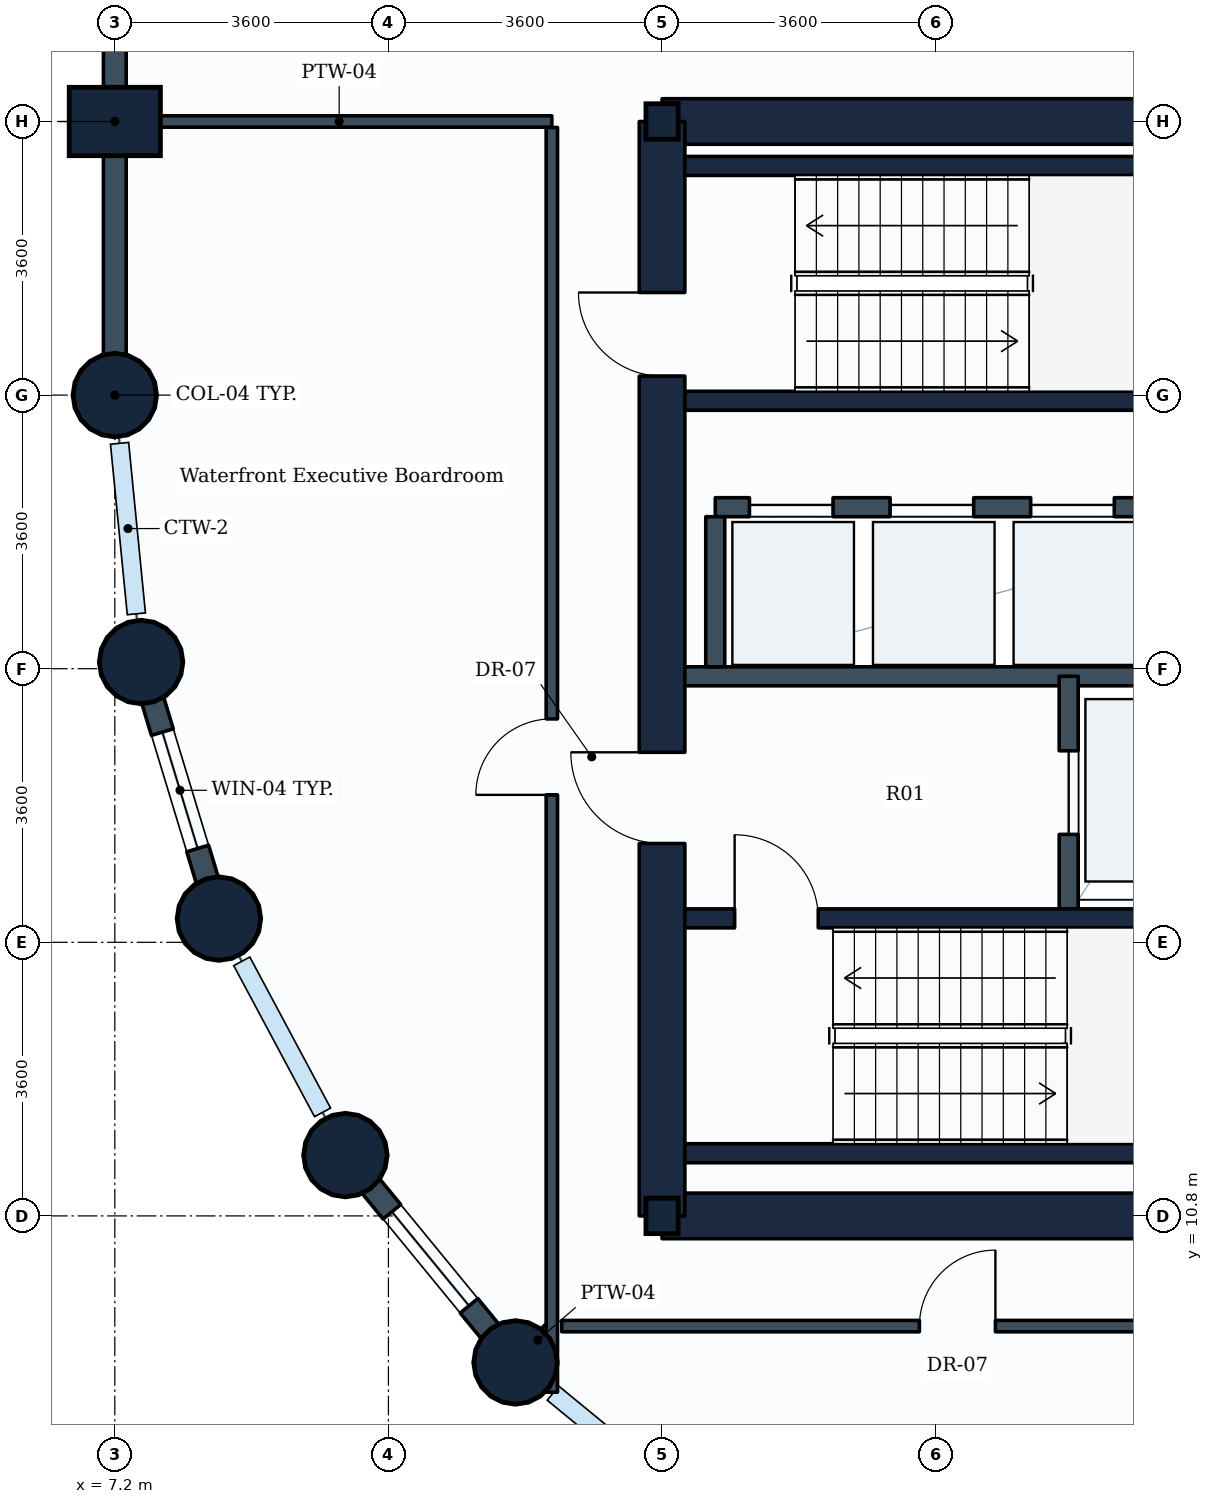
"""IFC4 building model, lengths in metres.
Left out: names, types, materials, properties, quantities, classifications, styles, units other than length and angle.
Written with IfcOpenShell. Run it as: python <this file> out.ifc"""

import sys

from ifc_helpers import new_model, si_unit, direction, frame, frame_2d, origin, origin_2d, place, context, subcontext, project, spatial, rectangle, circle, i_section, extrude, element, fill, save


model = new_model("IFC4")
c1 = context("Model", 3, precision=1e-05, world=origin(), true_north=direction((0.0, 1.0)))
c2 = subcontext(c1, "Body", "Model", "MODEL_VIEW")
j1 = project(units=[si_unit("LENGTHUNIT", "METRE"), si_unit("PLANEANGLEUNIT", "RADIAN")], contexts=[c1])
p1 = place(None, origin())
s1 = spatial("IfcSite", under=j1, at=p1, CompositionType="ELEMENT")
p2 = place(p1, origin())
s2 = spatial("IfcBuilding", under=s1, at=p2, CompositionType="ELEMENT")
p3 = place(p2, frame((0.0, 0.0, 27.9)))
s3 = spatial("IfcBuildingStorey", under=s2, at=p3, CompositionType="ELEMENT", Elevation=27.9)
p4 = place(p3, frame((7.2, 21.6, 0.0), z_axis=(0.0, 0.0, 1.0), x_axis=(1.0, 0.0, 0.0)))
e1 = element("IfcColumn", 1, at=p4, inside=s3, PredefinedType="COLUMN", context=c2, shape_type="SweptSolid", body=[
    extrude(circle(Radius=0.55, at=origin_2d()), origin(), (0.0, 0.0, 1.0), 3.9),
])
p5 = place(p3, frame((7.2, 25.2, 0.0), z_axis=(0.0, 0.0, 1.0), x_axis=(0.0, 1.0, 0.0)))
e2 = element("IfcColumn", 2, at=p5, inside=s3, PredefinedType="COLUMN", context=c2, shape_type="SweptSolid", body=[
    extrude(rectangle(XDim=0.9, YDim=1.2, at=origin_2d()), origin(), (0.0, 0.0, 1.0), 3.9),
])
for number, where, z_axis, x_axis in (
    (3, (7.546, 18.088, 0.0), (0.0, 0.0, 1.0), (1.0, 0.0, 0.0)),
    (4, (8.57, 14.712, 0.0), (0.0, 0.0, 1.0), (1.0, 0.0, 0.0)),
    (5, (10.234, 11.6, 0.0), (0.0, 0.0, 1.0), (1.0, 0.0, 0.0)),
    (6, (12.472, 8.872, 0.0), (0.0, 0.0, 1.0), (1.0, 0.0, 0.0)),
):
    element("IfcColumn", number, at=place(p3, frame(where, z_axis=z_axis, x_axis=x_axis)), inside=s3, PredefinedType="COLUMN", context=c2, shape_type="SweptSolid", body=[
        extrude(circle(Radius=0.55, at=origin_2d()), origin(), (0.0, 0.0, 1.0), 3.9),
    ])
for number, where, z_axis, x_axis in (
    (7, (14.4, 10.8, 0.0), (0.0, 0.0, 1.0), (1.0, 0.0, 0.0)),
    (8, (14.4, 25.2, 0.0), (0.0, 0.0, 1.0), (1.0, 0.0, 0.0)),
):
    element("IfcColumn", number, at=place(p3, frame(where, z_axis=z_axis, x_axis=x_axis)), inside=s3, PredefinedType="COLUMN", context=c2, shape_type="SweptSolid", body=[
        extrude(i_section(OverallWidth=0.424, OverallDepth=0.467, WebThickness=0.033, FlangeThickness=0.053, FilletRadius=0.015, at=origin_2d()), origin(), (0.0, 0.0, 1.0), 3.9),
    ])
p6 = place(p3, frame((7.2, 25.2, 0.0), z_axis=(0.0, 0.0, 1.0), x_axis=(0.0, 1.0, 0.0)))
e9 = element("IfcWall", 9, at=p6, inside=s3, PredefinedType="STANDARD", context=c2, shape_type="SweptSolid", body=[
    extrude(rectangle(XDim=3.6, YDim=0.3, at=frame_2d((1.8, 0.0))), origin(), (0.0, 0.0, 1.0), 2.93),
])
p7 = place(p3, frame((7.2, 21.6, 0.0), z_axis=(0.0, 0.0, 1.0), x_axis=(0.0, 1.0, 0.0)))
e10 = element("IfcWall", 10, at=p7, inside=s3, PredefinedType="STANDARD", context=c2, shape_type="SweptSolid", body=[
    extrude(rectangle(XDim=3.6, YDim=0.3, at=frame_2d((1.8, 0.0))), origin(), (0.0, 0.0, 1.0), 2.93),
])
p8 = place(p3, frame((8.57, 14.712, 0.0), z_axis=(0.0, 0.0, 1.0), x_axis=(-0.290305086481, 0.956934144423, 0.0)))
e11 = element("IfcWall", 11, at=p8, inside=s3, PredefinedType="STANDARD", context=c2, shape_type="SweptSolid", body=[
    extrude(rectangle(XDim=3.528, YDim=0.3, at=frame_2d((1.764, 0.0))), origin(), (0.0, 0.0, 1.0), 2.93),
])
p9 = place(p8, frame((0.964, 0.0, 0.85)))
e12 = element("IfcOpeningElement", 12, at=p9, cuts=e11, PredefinedType="OPENING", context=c2, shape_type="SweptSolid", body=[
    extrude(rectangle(XDim=1.6, YDim=1.35, at=frame_2d((0.8, 0.675))), frame((0.0, 0.16, 0.0), z_axis=(0.0, -1.0, 0.0), x_axis=(1.0, 0.0, 0.0)), (0.0, 0.0, 1.0), 0.32),
])
p10 = place(p3, frame((12.472, 8.872, 0.0), z_axis=(0.0, 0.0, 1.0), x_axis=(-0.634258295121, 0.773121216285, 0.0)))
e13 = element("IfcWall", 13, at=p10, inside=s3, PredefinedType="STANDARD", context=c2, shape_type="SweptSolid", body=[
    extrude(rectangle(XDim=3.529, YDim=0.3, at=frame_2d((1.764, 0.0))), origin(), (0.0, 0.0, 1.0), 2.93),
])
p11 = place(p10, frame((0.964, 0.0, 0.85)))
e14 = element("IfcOpeningElement", 14, at=p11, cuts=e13, PredefinedType="OPENING", context=c2, shape_type="SweptSolid", body=[
    extrude(rectangle(XDim=1.6, YDim=1.35, at=frame_2d((0.8, 0.675))), frame((0.0, 0.16, 0.0), z_axis=(0.0, -1.0, 0.0), x_axis=(1.0, 0.0, 0.0)), (0.0, 0.0, 1.0), 0.32),
])
p12 = place(p3, frame((14.4, 10.8, 0.0), z_axis=(0.0, 0.0, 1.0), x_axis=(1.0, 0.0, 0.0)))
e15 = element("IfcWall", 15, at=p12, inside=s3, PredefinedType="SHEAR", context=c2, shape_type="SweptSolid", body=[
    extrude(rectangle(XDim=18.0, YDim=0.6, at=frame_2d((9.0, 0.0))), origin(), (0.0, 0.0, 1.0), 3.65),
])
p13 = place(p3, frame((14.4, 25.2, 0.0), z_axis=(0.0, 0.0, 1.0), x_axis=(1.0, 0.0, 0.0)))
e16 = element("IfcWall", 16, at=p13, inside=s3, PredefinedType="SHEAR", context=c2, shape_type="SweptSolid", body=[
    extrude(rectangle(XDim=14.4, YDim=0.6, at=frame_2d((7.2, 0.0))), origin(), (0.0, 0.0, 1.0), 3.65),
])
p14 = place(p3, frame((14.4, 10.8, 0.0), z_axis=(0.0, 0.0, 1.0), x_axis=(0.0, 1.0, 0.0)))
e17 = element("IfcWall", 17, at=p14, inside=s3, PredefinedType="SHEAR", context=c2, shape_type="SweptSolid", body=[
    extrude(rectangle(XDim=14.4, YDim=0.6, at=frame_2d((7.2, 0.0))), origin(), (0.0, 0.0, 1.0), 3.65),
])
p15 = place(p14, frame((11.05, 0.0, 0.0)))
e18 = element("IfcOpeningElement", 18, at=p15, cuts=e17, PredefinedType="OPENING", context=c2, shape_type="SweptSolid", body=[
    extrude(rectangle(XDim=1.1, YDim=2.1, at=frame_2d((0.55, 1.05))), frame((0.0, 0.31, 0.0), z_axis=(0.0, -1.0, 0.0), x_axis=(1.0, 0.0, 0.0)), (0.0, 0.0, 1.0), 0.62),
])
p16 = place(p14, frame((4.9, 0.0, 0.0)))
e19 = element("IfcOpeningElement", 19, at=p16, cuts=e17, PredefinedType="OPENING", context=c2, shape_type="SweptSolid", body=[
    extrude(rectangle(XDim=1.2, YDim=2.1, at=frame_2d((0.6, 1.05))), frame((0.0, 0.31, 0.0), z_axis=(0.0, -1.0, 0.0), x_axis=(1.0, 0.0, 0.0)), (0.0, 0.0, 1.0), 0.62),
])
p17 = place(p3, frame((14.7, 11.625, 0.0), z_axis=(0.0, 0.0, 1.0), x_axis=(1.0, 0.0, 0.0)))
e20 = element("IfcWall", 20, at=p17, inside=s3, PredefinedType="SHEAR", context=c2, shape_type="SweptSolid", body=[
    extrude(rectangle(XDim=8.65, YDim=0.25, at=frame_2d((4.325, 0.0))), origin(), (0.0, 0.0, 1.0), 3.65),
])
p18 = place(p3, frame((14.7, 14.715, 0.0), z_axis=(0.0, 0.0, 1.0), x_axis=(1.0, 0.0, 0.0)))
e21 = element("IfcWall", 21, at=p18, inside=s3, PredefinedType="SHEAR", context=c2, shape_type="SweptSolid", body=[
    extrude(rectangle(XDim=8.65, YDim=0.25, at=frame_2d((4.325, 0.0))), origin(), (0.0, 0.0, 1.0), 3.65),
])
p19 = place(p18, frame((0.655, 0.0, 0.0)))
e22 = element("IfcOpeningElement", 22, at=p19, cuts=e21, PredefinedType="OPENING", context=c2, shape_type="SweptSolid", body=[
    extrude(rectangle(XDim=1.1, YDim=2.1, at=frame_2d((0.55, 1.05))), frame((0.0, 0.135, 0.0), z_axis=(0.0, -1.0, 0.0), x_axis=(1.0, 0.0, 0.0)), (0.0, 0.0, 1.0), 0.27),
])
for number, where, z_axis, x_axis in (
    (23, (14.7, 21.525, 0.0), (0.0, 0.0, 1.0), (1.0, 0.0, 0.0)),
    (24, (14.7, 24.615, 0.0), (0.0, 0.0, 1.0), (1.0, 0.0, 0.0)),
):
    element("IfcWall", number, at=place(p3, frame(where, z_axis=z_axis, x_axis=x_axis)), inside=s3, PredefinedType="SHEAR", context=c2, shape_type="SweptSolid", body=[
        extrude(rectangle(XDim=8.2, YDim=0.25, at=frame_2d((4.1, 0.0))), origin(), (0.0, 0.0, 1.0), 3.65),
    ])
p20 = place(p3, frame((14.65, 17.9, 0.0), z_axis=(0.0, 0.0, 1.0), x_axis=(1.0, 0.0, 0.0)))
e25 = element("IfcWall", 25, at=p20, inside=s3, PredefinedType="PARTITIONING", context=c2, shape_type="SweptSolid", body=[
    extrude(rectangle(XDim=7.15, YDim=0.25, at=frame_2d((3.575, 0.0))), origin(), (0.0, 0.0, 1.0), 3.635),
])
p21 = place(p3, frame((19.75, 14.84, 0.0), z_axis=(0.0, 0.0, 1.0), x_axis=(0.0, 1.0, 0.0)))
e26 = element("IfcWall", 26, at=p21, inside=s3, PredefinedType="PARTITIONING", context=c2, shape_type="SweptSolid", body=[
    extrude(rectangle(XDim=3.06, YDim=0.25, at=frame_2d((1.53, 0.0))), origin(), (0.0, 0.0, 1.0), 3.635),
])
p22 = place(p21, frame((0.98, 0.0, 0.0)))
e27 = element("IfcOpeningElement", 27, at=p22, cuts=e26, PredefinedType="OPENING", context=c2, shape_type="SweptSolid", body=[
    extrude(rectangle(XDim=1.1, YDim=2.1, at=frame_2d((0.55, 1.05))), frame((0.0, 0.135, 0.0), z_axis=(0.0, -1.0, 0.0), x_axis=(1.0, 0.0, 0.0)), (0.0, 0.0, 1.0), 0.27),
])
p23 = place(p3, frame((15.1, 20.125, 0.0), z_axis=(0.0, 0.0, 1.0), x_axis=(1.0, 0.0, 0.0)))
e28 = element("IfcWall", 28, at=p23, inside=s3, PredefinedType="PARTITIONING", context=c2, shape_type="SweptSolid", body=[
    extrude(rectangle(XDim=7.55, YDim=0.25, at=frame_2d((3.775, 0.0))), origin(), (0.0, 0.0, 1.0), 3.635),
])
p24 = place(p23, frame((0.45, 0.0, 0.0)))
e29 = element("IfcOpeningElement", 29, at=p24, cuts=e28, PredefinedType="OPENING", context=c2, shape_type="SweptSolid", body=[
    extrude(rectangle(XDim=1.1, YDim=2.1, at=frame_2d((0.55, 1.05))), frame((0.0, 0.135, 0.0), z_axis=(0.0, -1.0, 0.0), x_axis=(1.0, 0.0, 0.0)), (0.0, 0.0, 1.0), 0.27),
])
p25 = place(p23, frame((2.3, 0.0, 0.0)))
e30 = element("IfcOpeningElement", 30, at=p25, cuts=e28, PredefinedType="OPENING", context=c2, shape_type="SweptSolid", body=[
    extrude(rectangle(XDim=1.1, YDim=2.1, at=frame_2d((0.55, 1.05))), frame((0.0, 0.135, 0.0), z_axis=(0.0, -1.0, 0.0), x_axis=(1.0, 0.0, 0.0)), (0.0, 0.0, 1.0), 0.27),
])
p26 = place(p23, frame((4.15, 0.0, 0.0)))
e31 = element("IfcOpeningElement", 31, at=p26, cuts=e28, PredefinedType="OPENING", context=c2, shape_type="SweptSolid", body=[
    extrude(rectangle(XDim=1.1, YDim=2.1, at=frame_2d((0.55, 1.05))), frame((0.0, 0.135, 0.0), z_axis=(0.0, -1.0, 0.0), x_axis=(1.0, 0.0, 0.0)), (0.0, 0.0, 1.0), 0.27),
])
p27 = place(p23, frame((6.0, 0.0, 0.0)))
e32 = element("IfcOpeningElement", 32, at=p27, cuts=e28, PredefinedType="OPENING", context=c2, shape_type="SweptSolid", body=[
    extrude(rectangle(XDim=1.1, YDim=2.1, at=frame_2d((0.55, 1.05))), frame((0.0, 0.135, 0.0), z_axis=(0.0, -1.0, 0.0), x_axis=(1.0, 0.0, 0.0)), (0.0, 0.0, 1.0), 0.27),
])
p28 = place(p3, frame((15.1, 18.025, 0.0), z_axis=(0.0, 0.0, 1.0), x_axis=(0.0, 1.0, 0.0)))
e33 = element("IfcWall", 33, at=p28, inside=s3, PredefinedType="PARTITIONING", context=c2, shape_type="SweptSolid", body=[
    extrude(rectangle(XDim=1.975, YDim=0.25, at=frame_2d((0.988, 0.0))), origin(), (0.0, 0.0, 1.0), 3.635),
])
p29 = place(p3, frame((7.354, 25.2, 0.0), z_axis=(0.0, 0.0, 1.0), x_axis=(1.0, 0.0, 0.0)))
e34 = element("IfcWall", 34, at=p29, inside=s3, PredefinedType="PARTITIONING", context=c2, shape_type="SweptSolid", body=[
    extrude(rectangle(XDim=5.596, YDim=0.15, at=frame_2d((2.798, 0.0))), origin(), (0.0, 0.0, 1.0), 3.635),
])
p30 = place(p3, frame((12.95, 9.35, 0.0), z_axis=(0.0, 0.0, 1.0), x_axis=(-0.707106781187, -0.707106781187, 0.0)))
e35 = element("IfcWall", 35, at=p30, inside=s3, PredefinedType="PARTITIONING", context=c2, shape_type="SweptSolid", body=[
    extrude(rectangle(XDim=0.522, YDim=0.15, at=frame_2d((0.261, 0.0))), origin(), (0.0, 0.0, 1.0), 3.08),
])
p31 = place(p3, frame((12.95, 8.48, 0.0), z_axis=(0.0, 0.0, 1.0), x_axis=(0.0, 1.0, 0.0)))
e36 = element("IfcWall", 36, at=p31, inside=s3, PredefinedType="PARTITIONING", context=c2, shape_type="SweptSolid", body=[
    extrude(rectangle(XDim=16.641, YDim=0.15, at=frame_2d((8.321, 0.0))), origin(), (0.0, 0.0, 1.0), 2.93),
])
p32 = place(p31, frame((7.86, 0.0, 0.0)))
e37 = element("IfcOpeningElement", 37, at=p32, cuts=e36, PredefinedType="OPENING", context=c2, shape_type="SweptSolid", body=[
    extrude(rectangle(XDim=1.0, YDim=2.1, at=frame_2d((0.5, 1.05))), frame((0.0, 0.085, 0.0), z_axis=(0.0, -1.0, 0.0), x_axis=(1.0, 0.0, 0.0)), (0.0, 0.0, 1.0), 0.17),
])
p33 = place(p3, frame((13.08, 9.35, 0.0), z_axis=(0.0, 0.0, 1.0), x_axis=(1.0, 0.0, 0.0)))
e38 = element("IfcWall", 38, at=p33, inside=s3, PredefinedType="PARTITIONING", context=c2, shape_type="SweptSolid", body=[
    extrude(rectangle(XDim=15.641, YDim=0.15, at=frame_2d((7.82, 0.0))), origin(), (0.0, 0.0, 1.0), 3.04),
])
p34 = place(p33, frame((4.706, 0.0, 0.0)))
e39 = element("IfcOpeningElement", 39, at=p34, cuts=e38, PredefinedType="OPENING", context=c2, shape_type="SweptSolid", body=[
    extrude(rectangle(XDim=1.0, YDim=2.1, at=frame_2d((0.5, 1.05))), frame((0.0, 0.085, 0.0), z_axis=(0.0, -1.0, 0.0), x_axis=(1.0, 0.0, 0.0)), (0.0, 0.0, 1.0), 0.17),
])
p35 = place(p9, origin())
e40 = element("IfcWindow", 40, at=p35, inside=s3, PartitioningType="SINGLE_PANEL", PredefinedType="WINDOW", context=c2, shape_type="SweptSolid", body=[
    extrude(rectangle(XDim=1.6, YDim=1.35, at=frame_2d((0.8, 0.675))), frame((0.0, 0.03, 0.0), z_axis=(0.0, -1.0, 0.0), x_axis=(1.0, 0.0, 0.0)), (0.0, 0.0, 1.0), 0.06),
])
fill(e12, e40)
p36 = place(p11, origin())
e41 = element("IfcWindow", 41, at=p36, inside=s3, PartitioningType="SINGLE_PANEL", PredefinedType="WINDOW", context=c2, shape_type="SweptSolid", body=[
    extrude(rectangle(XDim=1.6, YDim=1.35, at=frame_2d((0.8, 0.675))), frame((0.0, 0.03, 0.0), z_axis=(0.0, -1.0, 0.0), x_axis=(1.0, 0.0, 0.0)), (0.0, 0.0, 1.0), 0.06),
])
fill(e14, e41)
p37 = place(p19, origin())
e42 = element("IfcDoor", 42, at=p37, inside=s3, OperationType="SINGLE_SWING_LEFT", PredefinedType="DOOR", context=c2, shape_type="SweptSolid", body=[
    extrude(rectangle(XDim=1.1, YDim=2.1, at=frame_2d((0.55, 1.05))), frame((0.0, 0.025, 0.0), z_axis=(0.0, -1.0, 0.0), x_axis=(1.0, 0.0, 0.0)), (0.0, 0.0, 1.0), 0.05),
])
fill(e22, e42)
p38 = place(p15, origin())
e43 = element("IfcDoor", 43, at=p38, inside=s3, OperationType="SINGLE_SWING_RIGHT", PredefinedType="DOOR", context=c2, shape_type="SweptSolid", body=[
    extrude(rectangle(XDim=1.1, YDim=2.1, at=frame_2d((0.55, 1.05))), frame((0.0, 0.025, 0.0), z_axis=(0.0, -1.0, 0.0), x_axis=(1.0, 0.0, 0.0)), (0.0, 0.0, 1.0), 0.05),
])
fill(e18, e43)
p39 = place(p22, origin())
e44 = element("IfcDoor", 44, at=p39, inside=s3, OperationType="SLIDING_TO_LEFT", PredefinedType="DOOR", context=c2, shape_type="SweptSolid", body=[
    extrude(rectangle(XDim=1.1, YDim=2.1, at=frame_2d((0.55, 1.05))), frame((0.0, 0.025, 0.0), z_axis=(0.0, -1.0, 0.0), x_axis=(1.0, 0.0, 0.0)), (0.0, 0.0, 1.0), 0.05),
])
fill(e27, e44)
p40 = place(p16, origin())
e45 = element("IfcDoor", 45, at=p40, inside=s3, OperationType="SINGLE_SWING_RIGHT", PredefinedType="DOOR", context=c2, shape_type="SweptSolid", body=[
    extrude(rectangle(XDim=1.2, YDim=2.1, at=frame_2d((0.6, 1.05))), frame((0.0, 0.025, 0.0), z_axis=(0.0, -1.0, 0.0), x_axis=(1.0, 0.0, 0.0)), (0.0, 0.0, 1.0), 0.05),
])
fill(e19, e45)
p41 = place(p24, origin())
e46 = element("IfcDoor", 46, at=p41, inside=s3, OperationType="SLIDING_TO_LEFT", PredefinedType="DOOR", context=c2, shape_type="SweptSolid", body=[
    extrude(rectangle(XDim=1.1, YDim=2.1, at=frame_2d((0.55, 1.05))), frame((0.0, 0.025, 0.0), z_axis=(0.0, -1.0, 0.0), x_axis=(1.0, 0.0, 0.0)), (0.0, 0.0, 1.0), 0.05),
])
fill(e29, e46)
p42 = place(p25, origin())
e47 = element("IfcDoor", 47, at=p42, inside=s3, OperationType="SLIDING_TO_LEFT", PredefinedType="DOOR", context=c2, shape_type="SweptSolid", body=[
    extrude(rectangle(XDim=1.1, YDim=2.1, at=frame_2d((0.55, 1.05))), frame((0.0, 0.025, 0.0), z_axis=(0.0, -1.0, 0.0), x_axis=(1.0, 0.0, 0.0)), (0.0, 0.0, 1.0), 0.05),
])
fill(e30, e47)
p43 = place(p26, origin())
e48 = element("IfcDoor", 48, at=p43, inside=s3, OperationType="SLIDING_TO_LEFT", PredefinedType="DOOR", context=c2, shape_type="SweptSolid", body=[
    extrude(rectangle(XDim=1.1, YDim=2.1, at=frame_2d((0.55, 1.05))), frame((0.0, 0.025, 0.0), z_axis=(0.0, -1.0, 0.0), x_axis=(1.0, 0.0, 0.0)), (0.0, 0.0, 1.0), 0.05),
])
fill(e31, e48)
p44 = place(p32, origin())
e49 = element("IfcDoor", 49, at=p44, inside=s3, OperationType="SINGLE_SWING_LEFT", PredefinedType="DOOR", context=c2, shape_type="SweptSolid", body=[
    extrude(rectangle(XDim=1.0, YDim=2.1, at=frame_2d((0.5, 1.05))), frame((0.0, 0.025, 0.0), z_axis=(0.0, -1.0, 0.0), x_axis=(1.0, 0.0, 0.0)), (0.0, 0.0, 1.0), 0.05),
])
fill(e37, e49)
p45 = place(p34, origin())
e50 = element("IfcDoor", 50, at=p45, inside=s3, OperationType="SINGLE_SWING_RIGHT", PredefinedType="DOOR", context=c2, shape_type="SweptSolid", body=[
    extrude(rectangle(XDim=1.0, YDim=2.1, at=frame_2d((0.5, 1.05))), frame((0.0, 0.025, 0.0), z_axis=(0.0, -1.0, 0.0), x_axis=(1.0, 0.0, 0.0)), (0.0, 0.0, 1.0), 0.05),
])
fill(e39, e50)
save(model, sys.argv[1])
